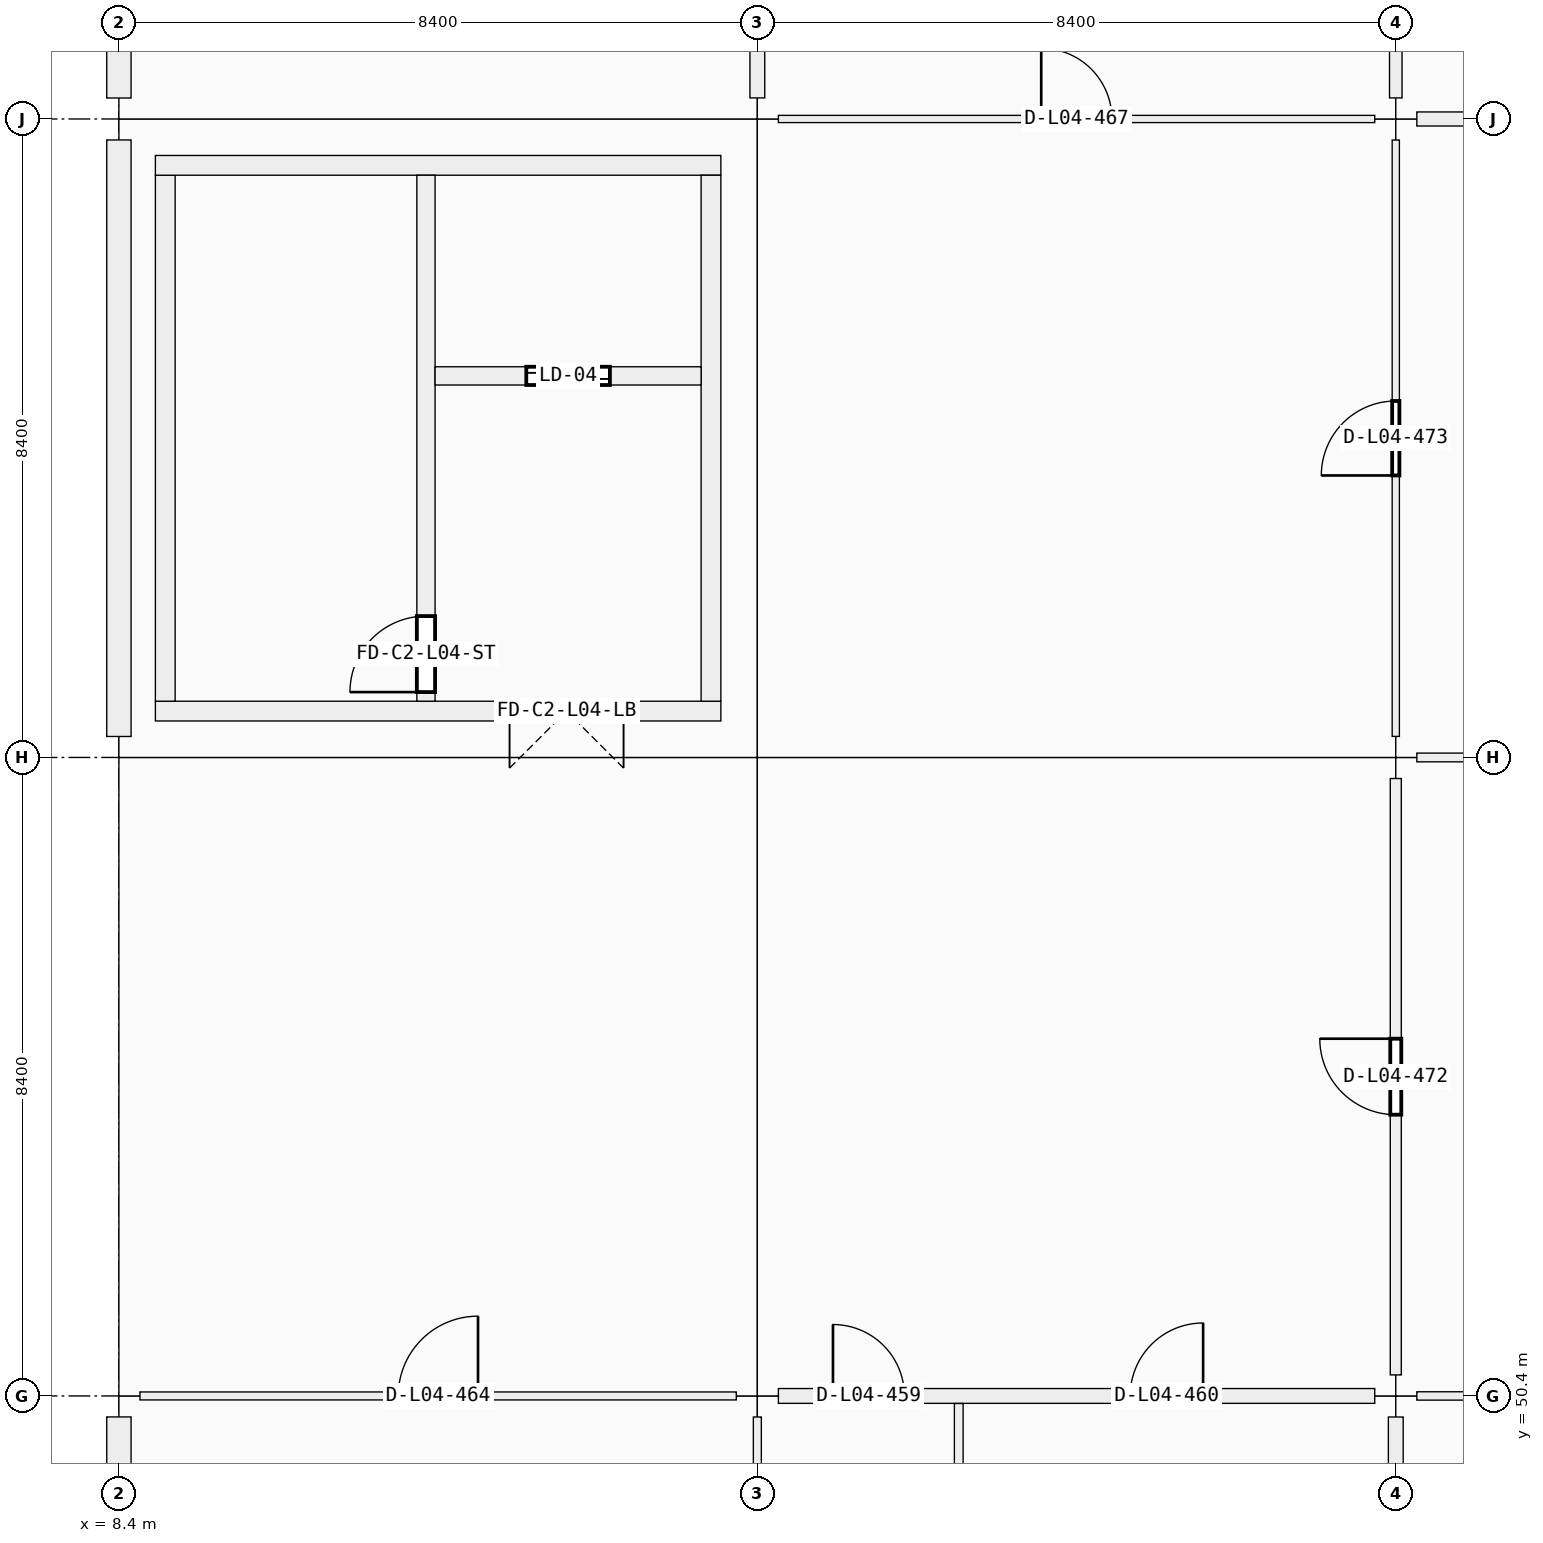
"""IFC4 building model, lengths in metres.
Left out: names, types, materials, properties, quantities, classifications, styles, units other than length and angle.
Written with IfcOpenShell. Run it as: python <this file> out.ifc"""

import sys

from ifc_helpers import new_model, si_unit, direction, frame, frame_2d, origin, origin_2d, place, context, subcontext, project, spatial, rectangle, i_section, extrude, element, fill, save


model = new_model("IFC4")
c1 = context("Model", 3, precision=1e-05, world=origin(), true_north=direction((0.0, 1.0)))
c2 = subcontext(c1, "Body", "Model", "MODEL_VIEW")
j1 = project(units=[si_unit("LENGTHUNIT", "METRE"), si_unit("PLANEANGLEUNIT", "RADIAN")], contexts=[c1])
p1 = place(None, origin())
s1 = spatial("IfcSite", under=j1, at=p1, CompositionType="ELEMENT")
p2 = place(p1, origin())
s2 = spatial("IfcBuilding", under=s1, at=p2, CompositionType="ELEMENT")
p3 = place(p2, frame((0.0, 0.0, 19.08)))
s3 = spatial("IfcBuildingStorey", under=s2, at=p3, CompositionType="ELEMENT", Elevation=19.08)
for number, where, z_axis, x_axis in (
    (1, (8.4, 50.4, 0.0), (0.0, 0.0, 1.0), (1.0, 0.0, 0.0)),
    (2, (8.4, 58.8, 0.0), (0.0, 0.0, 1.0), (1.0, 0.0, 0.0)),
    (3, (8.4, 67.2, 0.0), (0.0, 0.0, 1.0), (1.0, 0.0, 0.0)),
    (4, (16.8, 50.4, 0.0), (0.0, 0.0, 1.0), (1.0, 0.0, 0.0)),
    (5, (16.8, 58.8, 0.0), (0.0, 0.0, 1.0), (1.0, 0.0, 0.0)),
    (6, (16.8, 67.2, 0.0), (0.0, 0.0, 1.0), (1.0, 0.0, 0.0)),
    (7, (25.2, 50.4, 0.0), (0.0, 0.0, 1.0), (1.0, 0.0, 0.0)),
    (8, (25.2, 58.8, 0.0), (0.0, 0.0, 1.0), (1.0, 0.0, 0.0)),
    (9, (25.2, 67.2, 0.0), (0.0, 0.0, 1.0), (1.0, 0.0, 0.0)),
):
    element("IfcColumn", number, at=place(p3, frame(where, z_axis=z_axis, x_axis=x_axis)), inside=s3, PredefinedType="COLUMN", context=c2, shape_type="SweptSolid", body=[
        extrude(rectangle(XDim=0.55, YDim=0.55, at=origin_2d()), origin(), (0.0, 0.0, 1.0), 4.16),
    ])
for number, where, z_axis, x_axis in (
    (10, (16.8, 50.4, 4.16), (0.0, 0.0, 1.0), (1.0, 0.0, 0.0)),
    (11, (25.2, 50.4, 4.16), (0.0, 0.0, 1.0), (1.0, 0.0, 0.0)),
    (12, (16.8, 58.8, 4.16), (0.0, 0.0, 1.0), (1.0, 0.0, 0.0)),
    (13, (25.2, 58.8, 4.16), (0.0, 0.0, 1.0), (1.0, 0.0, 0.0)),
    (14, (16.8, 67.2, 4.16), (0.0, 0.0, 1.0), (1.0, 0.0, 0.0)),
    (15, (25.2, 67.2, 4.16), (0.0, 0.0, 1.0), (1.0, 0.0, 0.0)),
):
    element("IfcColumn", number, at=place(p3, frame(where, z_axis=z_axis, x_axis=x_axis)), inside=s3, PredefinedType="COLUMN", context=c2, shape_type="SweptSolid", body=[
        extrude(i_section(OverallWidth=0.305, OverallDepth=0.308, WebThickness=0.01, FlangeThickness=0.015, FilletRadius=0.017, at=origin_2d()), origin(), (0.0, 0.0, 1.0), 1.925),
    ])
for number, where, z_axis, x_axis in (
    (16, (8.4, 42.276, 0.0), (0.0, 0.0, 1.0), (0.0, 1.0, 0.0)),
    (17, (8.4, 59.076, 0.0), (0.0, 0.0, 1.0), (0.0, 1.0, 0.0)),
):
    element("IfcWall", number, at=place(p3, frame(where, z_axis=z_axis, x_axis=x_axis)), inside=s3, PredefinedType="SOLIDWALL", context=c2, shape_type="SweptSolid", body=[
        extrude(rectangle(XDim=7.848, YDim=0.32, at=frame_2d((3.924, 0.0))), origin(), (0.0, 0.0, 1.0), 3.37),
    ])
p4 = place(p3, frame((8.4, 67.476, 0.0), z_axis=(0.0, 0.0, 1.0), x_axis=(0.0, 1.0, 0.0)))
e18 = element("IfcWall", 18, at=p4, inside=s3, PredefinedType="SOLIDWALL", context=c2, shape_type="SweptSolid", body=[
    extrude(rectangle(XDim=7.848, YDim=0.32, at=frame_2d((3.924, 0.0))), origin(), (0.0, 0.0, 1.0), 3.37),
])
p5 = place(p3, frame((16.32, 59.41, 0.0), z_axis=(0.0, 0.0, 1.0), x_axis=(-1.0, 0.0, 0.0)))
e19 = element("IfcWall", 19, at=p5, inside=s3, PredefinedType="SHEAR", context=c2, shape_type="SweptSolid", body=[
    extrude(rectangle(XDim=7.44, YDim=0.26, at=frame_2d((3.72, 0.0))), origin(), (0.0, 0.0, 1.0), 4.07),
])
p6 = place(p5, frame((1.28, 0.0, 0.0)))
e20 = element("IfcOpeningElement", 20, at=p6, cuts=e19, PredefinedType="OPENING", context=c2, shape_type="SweptSolid", body=[
    extrude(rectangle(XDim=1.5, YDim=2.15, at=frame_2d((0.75, 1.075))), frame((0.0, 0.13, 0.0), z_axis=(0.0, -1.0, 0.0), x_axis=(1.0, 0.0, 0.0)), (0.0, 0.0, 1.0), 0.26),
])
p7 = place(p3, frame((9.01, 59.54, 0.0), z_axis=(0.0, 0.0, 1.0), x_axis=(0.0, 1.0, 0.0)))
e21 = element("IfcWall", 21, at=p7, inside=s3, PredefinedType="SHEAR", context=c2, shape_type="SweptSolid", body=[
    extrude(rectangle(XDim=6.92, YDim=0.26, at=frame_2d((3.46, 0.0))), origin(), (0.0, 0.0, 1.0), 4.07),
])
p8 = place(p3, frame((8.88, 66.59, 0.0), z_axis=(0.0, 0.0, 1.0), x_axis=(1.0, 0.0, 0.0)))
e22 = element("IfcWall", 22, at=p8, inside=s3, PredefinedType="SHEAR", context=c2, shape_type="SweptSolid", body=[
    extrude(rectangle(XDim=7.44, YDim=0.26, at=frame_2d((3.72, 0.0))), origin(), (0.0, 0.0, 1.0), 4.07),
])
p9 = place(p3, frame((16.19, 66.46, 0.0), z_axis=(0.0, 0.0, 1.0), x_axis=(0.0, -1.0, 0.0)))
e23 = element("IfcWall", 23, at=p9, inside=s3, PredefinedType="SHEAR", context=c2, shape_type="SweptSolid", body=[
    extrude(rectangle(XDim=6.92, YDim=0.26, at=frame_2d((3.46, 0.0))), origin(), (0.0, 0.0, 1.0), 4.07),
])
p10 = place(p3, frame((12.44, 59.54, 0.0), z_axis=(0.0, 0.0, 1.0), x_axis=(0.0, 1.0, 0.0)))
e24 = element("IfcWall", 24, at=p10, inside=s3, PredefinedType="SHEAR", context=c2, shape_type="SweptSolid", body=[
    extrude(rectangle(XDim=6.92, YDim=0.24, at=frame_2d((3.46, 0.0))), origin(), (0.0, 0.0, 1.0), 4.07),
])
p11 = place(p10, frame((0.12, 0.0, 0.0)))
e25 = element("IfcOpeningElement", 25, at=p11, cuts=e24, PredefinedType="OPENING", context=c2, shape_type="SweptSolid", body=[
    extrude(rectangle(XDim=1.0, YDim=2.15, at=frame_2d((0.5, 1.075))), frame((0.0, 0.12, 0.0), z_axis=(0.0, -1.0, 0.0), x_axis=(1.0, 0.0, 0.0)), (0.0, 0.0, 1.0), 0.24),
])
p12 = place(p3, frame((12.56, 63.82, 0.0), z_axis=(0.0, 0.0, 1.0), x_axis=(1.0, 0.0, 0.0)))
e26 = element("IfcWall", 26, at=p12, inside=s3, PredefinedType="SHEAR", context=c2, shape_type="SweptSolid", body=[
    extrude(rectangle(XDim=3.5, YDim=0.24, at=frame_2d((1.75, 0.0))), origin(), (0.0, 0.0, 1.0), 4.07),
])
p13 = place(p12, frame((1.2, 0.0, 0.0)))
e27 = element("IfcOpeningElement", 27, at=p13, cuts=e26, PredefinedType="OPENING", context=c2, shape_type="SweptSolid", body=[
    extrude(rectangle(XDim=1.1, YDim=2.15, at=frame_2d((0.55, 1.075))), frame((0.0, 0.12, 0.0), z_axis=(0.0, -1.0, 0.0), x_axis=(1.0, 0.0, 0.0)), (0.0, 0.0, 1.0), 0.24),
])
p14 = place(p3, frame((8.677, 50.4, 0.0), z_axis=(0.0, 0.0, 1.0), x_axis=(1.0, 0.0, 0.0)))
e28 = element("IfcWall", 28, at=p14, inside=s3, PredefinedType="PARTITIONING", context=c2, shape_type="SweptSolid", body=[
    extrude(rectangle(XDim=7.846, YDim=0.105, at=frame_2d((3.923, 0.0))), origin(), (0.0, 0.0, 1.0), 3.19),
])
p15 = place(p14, frame((3.398, 0.0, 0.0)))
e29 = element("IfcOpeningElement", 29, at=p15, cuts=e28, PredefinedType="OPENING", context=c2, shape_type="SweptSolid", body=[
    extrude(rectangle(XDim=1.05, YDim=2.12, at=frame_2d((0.525, 1.06))), frame((0.0, 0.052, 0.0), z_axis=(0.0, -1.0, 0.0), x_axis=(1.0, 0.0, 0.0)), (0.0, 0.0, 1.0), 0.105),
])
p16 = place(p3, frame((17.077, 50.4, 0.0), z_axis=(0.0, 0.0, 1.0), x_axis=(1.0, 0.0, 0.0)))
e30 = element("IfcWall", 30, at=p16, inside=s3, PredefinedType="PARTITIONING", context=c2, shape_type="SweptSolid", body=[
    extrude(rectangle(XDim=7.846, YDim=0.195, at=frame_2d((3.923, 0.0))), origin(), (0.0, 0.0, 1.0), 3.19),
])
p17 = place(p16, frame((0.718, 0.0, 0.0)))
e31 = element("IfcOpeningElement", 31, at=p17, cuts=e30, PredefinedType="OPENING", context=c2, shape_type="SweptSolid", body=[
    extrude(rectangle(XDim=0.94, YDim=2.08, at=frame_2d((0.47, 1.04))), frame((0.0, 0.098, 0.0), z_axis=(0.0, -1.0, 0.0), x_axis=(1.0, 0.0, 0.0)), (0.0, 0.0, 1.0), 0.195),
])
p18 = place(p16, frame((4.628, 0.0, 0.0)))
e32 = element("IfcOpeningElement", 32, at=p18, cuts=e30, PredefinedType="OPENING", context=c2, shape_type="SweptSolid", body=[
    extrude(rectangle(XDim=0.96, YDim=2.1, at=frame_2d((0.48, 1.05))), frame((0.0, 0.098, 0.0), z_axis=(0.0, -1.0, 0.0), x_axis=(1.0, 0.0, 0.0)), (0.0, 0.0, 1.0), 0.195),
])
p19 = place(p3, frame((17.077, 67.2, 0.0), z_axis=(0.0, 0.0, 1.0), x_axis=(1.0, 0.0, 0.0)))
e33 = element("IfcWall", 33, at=p19, inside=s3, PredefinedType="PARTITIONING", context=c2, shape_type="SweptSolid", body=[
    extrude(rectangle(XDim=7.846, YDim=0.095, at=frame_2d((3.923, 0.0))), origin(), (0.0, 0.0, 1.0), 3.19),
])
p20 = place(p19, frame((3.458, 0.0, 0.0)))
e34 = element("IfcOpeningElement", 34, at=p20, cuts=e33, PredefinedType="OPENING", context=c2, shape_type="SweptSolid", body=[
    extrude(rectangle(XDim=0.93, YDim=2.12, at=frame_2d((0.465, 1.06))), frame((0.0, 0.047, 0.0), z_axis=(0.0, -1.0, 0.0), x_axis=(1.0, 0.0, 0.0)), (0.0, 0.0, 1.0), 0.095),
])
p21 = place(p3, frame((25.477, 50.4, 0.0), z_axis=(0.0, 0.0, 1.0), x_axis=(1.0, 0.0, 0.0)))
e35 = element("IfcWall", 35, at=p21, inside=s3, PredefinedType="MOVABLE", context=c2, shape_type="SweptSolid", body=[
    extrude(rectangle(XDim=7.846, YDim=0.11, at=frame_2d((3.923, 0.0))), origin(), (0.0, 0.0, 1.0), 3.19),
])
p22 = place(p21, frame((3.433, 0.0, 0.0)))
e36 = element("IfcOpeningElement", 36, at=p22, cuts=e35, PredefinedType="OPENING", context=c2, shape_type="SweptSolid", body=[
    extrude(rectangle(XDim=0.98, YDim=2.18, at=frame_2d((0.49, 1.09))), frame((0.0, 0.055, 0.0), z_axis=(0.0, -1.0, 0.0), x_axis=(1.0, 0.0, 0.0)), (0.0, 0.0, 1.0), 0.11),
])
p23 = place(p3, frame((25.477, 58.8, 0.0), z_axis=(0.0, 0.0, 1.0), x_axis=(1.0, 0.0, 0.0)))
e37 = element("IfcWall", 37, at=p23, inside=s3, PredefinedType="PARTITIONING", context=c2, shape_type="SweptSolid", body=[
    extrude(rectangle(XDim=7.846, YDim=0.115, at=frame_2d((3.923, 0.0))), origin(), (0.0, 0.0, 1.0), 3.19),
])
p24 = place(p23, frame((3.443, 0.0, 0.0)))
e38 = element("IfcOpeningElement", 38, at=p24, cuts=e37, PredefinedType="OPENING", context=c2, shape_type="SweptSolid", body=[
    extrude(rectangle(XDim=0.96, YDim=2.18, at=frame_2d((0.48, 1.09))), frame((0.0, 0.058, 0.0), z_axis=(0.0, -1.0, 0.0), x_axis=(1.0, 0.0, 0.0)), (0.0, 0.0, 1.0), 0.115),
])
p25 = place(p3, frame((25.477, 67.2, 0.0), z_axis=(0.0, 0.0, 1.0), x_axis=(1.0, 0.0, 0.0)))
e39 = element("IfcWall", 39, at=p25, inside=s3, PredefinedType="PARTITIONING", context=c2, shape_type="SweptSolid", body=[
    extrude(rectangle(XDim=7.846, YDim=0.185, at=frame_2d((3.923, 0.0))), origin(), (0.0, 0.0, 1.0), 3.19),
])
p26 = place(p25, frame((3.453, 0.0, 0.0)))
e40 = element("IfcOpeningElement", 40, at=p26, cuts=e39, PredefinedType="OPENING", context=c2, shape_type="SweptSolid", body=[
    extrude(rectangle(XDim=0.94, YDim=2.15, at=frame_2d((0.47, 1.075))), frame((0.0, 0.093, 0.0), z_axis=(0.0, -1.0, 0.0), x_axis=(1.0, 0.0, 0.0)), (0.0, 0.0, 1.0), 0.185),
])
p27 = place(p3, frame((16.8, 42.277, 0.0), z_axis=(0.0, 0.0, 1.0), x_axis=(0.0, 1.0, 0.0)))
e41 = element("IfcWall", 41, at=p27, inside=s3, PredefinedType="PARTITIONING", context=c2, shape_type="SweptSolid", body=[
    extrude(rectangle(XDim=7.846, YDim=0.105, at=frame_2d((3.923, 0.0))), origin(), (0.0, 0.0, 1.0), 3.19),
])
p28 = place(p3, frame((16.8, 67.477, 0.0), z_axis=(0.0, 0.0, 1.0), x_axis=(0.0, 1.0, 0.0)))
e42 = element("IfcWall", 42, at=p28, inside=s3, PredefinedType="PARTITIONING", context=c2, shape_type="SweptSolid", body=[
    extrude(rectangle(XDim=7.846, YDim=0.195, at=frame_2d((3.923, 0.0))), origin(), (0.0, 0.0, 1.0), 3.19),
])
p29 = place(p28, frame((3.403, 0.0, 0.0)))
e43 = element("IfcOpeningElement", 43, at=p29, cuts=e42, PredefinedType="OPENING", context=c2, shape_type="SweptSolid", body=[
    extrude(rectangle(XDim=1.04, YDim=2.2, at=frame_2d((0.52, 1.1))), frame((0.0, 0.098, 0.0), z_axis=(0.0, -1.0, 0.0), x_axis=(1.0, 0.0, 0.0)), (0.0, 0.0, 1.0), 0.195),
])
p30 = place(p3, frame((25.2, 42.277, 0.0), z_axis=(0.0, 0.0, 1.0), x_axis=(0.0, 1.0, 0.0)))
e44 = element("IfcWall", 44, at=p30, inside=s3, PredefinedType="PARTITIONING", context=c2, shape_type="SweptSolid", body=[
    extrude(rectangle(XDim=7.846, YDim=0.195, at=frame_2d((3.923, 0.0))), origin(), (0.0, 0.0, 1.0), 3.19),
])
p31 = place(p3, frame((25.2, 50.677, 0.0), z_axis=(0.0, 0.0, 1.0), x_axis=(0.0, 1.0, 0.0)))
e45 = element("IfcWall", 45, at=p31, inside=s3, PredefinedType="PARTITIONING", context=c2, shape_type="SweptSolid", body=[
    extrude(rectangle(XDim=7.846, YDim=0.145, at=frame_2d((3.923, 0.0))), origin(), (0.0, 0.0, 1.0), 3.19),
])
p32 = place(p31, frame((3.423, 0.0, 0.0)))
e46 = element("IfcOpeningElement", 46, at=p32, cuts=e45, PredefinedType="OPENING", context=c2, shape_type="SweptSolid", body=[
    extrude(rectangle(XDim=1.0, YDim=2.2, at=frame_2d((0.5, 1.1))), frame((0.0, 0.073, 0.0), z_axis=(0.0, -1.0, 0.0), x_axis=(1.0, 0.0, 0.0)), (0.0, 0.0, 1.0), 0.145),
])
p33 = place(p3, frame((25.2, 59.077, 0.0), z_axis=(0.0, 0.0, 1.0), x_axis=(0.0, 1.0, 0.0)))
e47 = element("IfcWall", 47, at=p33, inside=s3, PredefinedType="PARTITIONING", context=c2, shape_type="SweptSolid", body=[
    extrude(rectangle(XDim=7.846, YDim=0.095, at=frame_2d((3.923, 0.0))), origin(), (0.0, 0.0, 1.0), 3.19),
])
p34 = place(p33, frame((3.433, 0.0, 0.0)))
e48 = element("IfcOpeningElement", 48, at=p34, cuts=e47, PredefinedType="OPENING", context=c2, shape_type="SweptSolid", body=[
    extrude(rectangle(XDim=0.98, YDim=2.18, at=frame_2d((0.49, 1.09))), frame((0.0, 0.047, 0.0), z_axis=(0.0, -1.0, 0.0), x_axis=(1.0, 0.0, 0.0)), (0.0, 0.0, 1.0), 0.095),
])
p35 = place(p3, frame((25.2, 67.477, 0.0), z_axis=(0.0, 0.0, 1.0), x_axis=(0.0, 1.0, 0.0)))
e49 = element("IfcWall", 49, at=p35, inside=s3, PredefinedType="PARTITIONING", context=c2, shape_type="SweptSolid", body=[
    extrude(rectangle(XDim=7.846, YDim=0.165, at=frame_2d((3.923, 0.0))), origin(), (0.0, 0.0, 1.0), 3.19),
])
p36 = place(p35, frame((3.438, 0.0, 0.0)))
e50 = element("IfcOpeningElement", 50, at=p36, cuts=e49, PredefinedType="OPENING", context=c2, shape_type="SweptSolid", body=[
    extrude(rectangle(XDim=0.97, YDim=2.12, at=frame_2d((0.485, 1.06))), frame((0.0, 0.083, 0.0), z_axis=(0.0, -1.0, 0.0), x_axis=(1.0, 0.0, 0.0)), (0.0, 0.0, 1.0), 0.165),
])
p37 = place(p3, frame((19.45, 42.064, 0.0), z_axis=(0.0, 0.0, 1.0), x_axis=(0.0, 1.0, 0.0)))
e51 = element("IfcWall", 51, at=p37, inside=s3, PredefinedType="PARTITIONING", context=c2, shape_type="SweptSolid", body=[
    extrude(rectangle(XDim=8.236, YDim=0.115, at=frame_2d((4.118, 0.0))), origin(), (0.0, 0.0, 1.0), 3.19),
])
p38 = place(p11, origin())
e52 = element("IfcDoor", 52, at=p38, inside=s3, OperationType="SINGLE_SWING_LEFT", PredefinedType="DOOR", context=c2, shape_type="SweptSolid", body=[
    extrude(rectangle(XDim=1.0, YDim=2.15, at=frame_2d((0.5, 1.075))), frame((0.0, 0.025, 0.0), z_axis=(0.0, -1.0, 0.0), x_axis=(1.0, 0.0, 0.0)), (0.0, 0.0, 1.0), 0.05),
])
fill(e25, e52)
p39 = place(p6, origin())
e53 = element("IfcDoor", 53, at=p39, inside=s3, OperationType="DOUBLE_DOOR_SINGLE_SWING", PredefinedType="DOOR", context=c2, shape_type="SweptSolid", body=[
    extrude(rectangle(XDim=1.5, YDim=2.15, at=frame_2d((0.75, 1.075))), frame((0.0, 0.025, 0.0), z_axis=(0.0, -1.0, 0.0), x_axis=(1.0, 0.0, 0.0)), (0.0, 0.0, 1.0), 0.05),
])
fill(e20, e53)
p40 = place(p13, origin())
e54 = element("IfcDoor", 54, at=p40, inside=s3, OperationType="DOUBLE_DOOR_SLIDING", PredefinedType="DOOR", context=c2, shape_type="SweptSolid", body=[
    extrude(rectangle(XDim=1.1, YDim=2.15, at=frame_2d((0.55, 1.075))), frame((0.0, 0.025, 0.0), z_axis=(0.0, -1.0, 0.0), x_axis=(1.0, 0.0, 0.0)), (0.0, 0.0, 1.0), 0.05),
])
fill(e27, e54)
p41 = place(p17, origin())
e55 = element("IfcDoor", 55, at=p41, inside=s3, OperationType="SINGLE_SWING_LEFT", PredefinedType="DOOR", context=c2, shape_type="SweptSolid", body=[
    extrude(rectangle(XDim=0.94, YDim=2.08, at=frame_2d((0.47, 1.04))), frame((0.0, 0.025, 0.0), z_axis=(0.0, -1.0, 0.0), x_axis=(1.0, 0.0, 0.0)), (0.0, 0.0, 1.0), 0.05),
])
fill(e31, e55)
p42 = place(p18, origin())
e56 = element("IfcDoor", 56, at=p42, inside=s3, OperationType="SINGLE_SWING_RIGHT", PredefinedType="DOOR", context=c2, shape_type="SweptSolid", body=[
    extrude(rectangle(XDim=0.96, YDim=2.1, at=frame_2d((0.48, 1.05))), frame((0.0, 0.025, 0.0), z_axis=(0.0, -1.0, 0.0), x_axis=(1.0, 0.0, 0.0)), (0.0, 0.0, 1.0), 0.05),
])
fill(e32, e56)
p43 = place(p15, origin())
e57 = element("IfcDoor", 57, at=p43, inside=s3, OperationType="SINGLE_SWING_RIGHT", PredefinedType="DOOR", context=c2, shape_type="SweptSolid", body=[
    extrude(rectangle(XDim=1.05, YDim=2.12, at=frame_2d((0.525, 1.06))), frame((0.0, 0.025, 0.0), z_axis=(0.0, -1.0, 0.0), x_axis=(1.0, 0.0, 0.0)), (0.0, 0.0, 1.0), 0.05),
])
fill(e29, e57)
p44 = place(p20, origin())
e58 = element("IfcDoor", 58, at=p44, inside=s3, OperationType="SINGLE_SWING_LEFT", PredefinedType="DOOR", context=c2, shape_type="SweptSolid", body=[
    extrude(rectangle(XDim=0.93, YDim=2.12, at=frame_2d((0.465, 1.06))), frame((0.0, 0.025, 0.0), z_axis=(0.0, -1.0, 0.0), x_axis=(1.0, 0.0, 0.0)), (0.0, 0.0, 1.0), 0.05),
])
fill(e34, e58)
p45 = place(p32, origin())
e59 = element("IfcDoor", 59, at=p45, inside=s3, OperationType="SINGLE_SWING_RIGHT", PredefinedType="DOOR", context=c2, shape_type="SweptSolid", body=[
    extrude(rectangle(XDim=1.0, YDim=2.2, at=frame_2d((0.5, 1.1))), frame((0.0, 0.025, 0.0), z_axis=(0.0, -1.0, 0.0), x_axis=(1.0, 0.0, 0.0)), (0.0, 0.0, 1.0), 0.05),
])
fill(e46, e59)
p46 = place(p34, origin())
e60 = element("IfcDoor", 60, at=p46, inside=s3, OperationType="SINGLE_SWING_LEFT", PredefinedType="DOOR", context=c2, shape_type="SweptSolid", body=[
    extrude(rectangle(XDim=0.98, YDim=2.18, at=frame_2d((0.49, 1.09))), frame((0.0, 0.025, 0.0), z_axis=(0.0, -1.0, 0.0), x_axis=(1.0, 0.0, 0.0)), (0.0, 0.0, 1.0), 0.05),
])
fill(e48, e60)
save(model, sys.argv[1])
